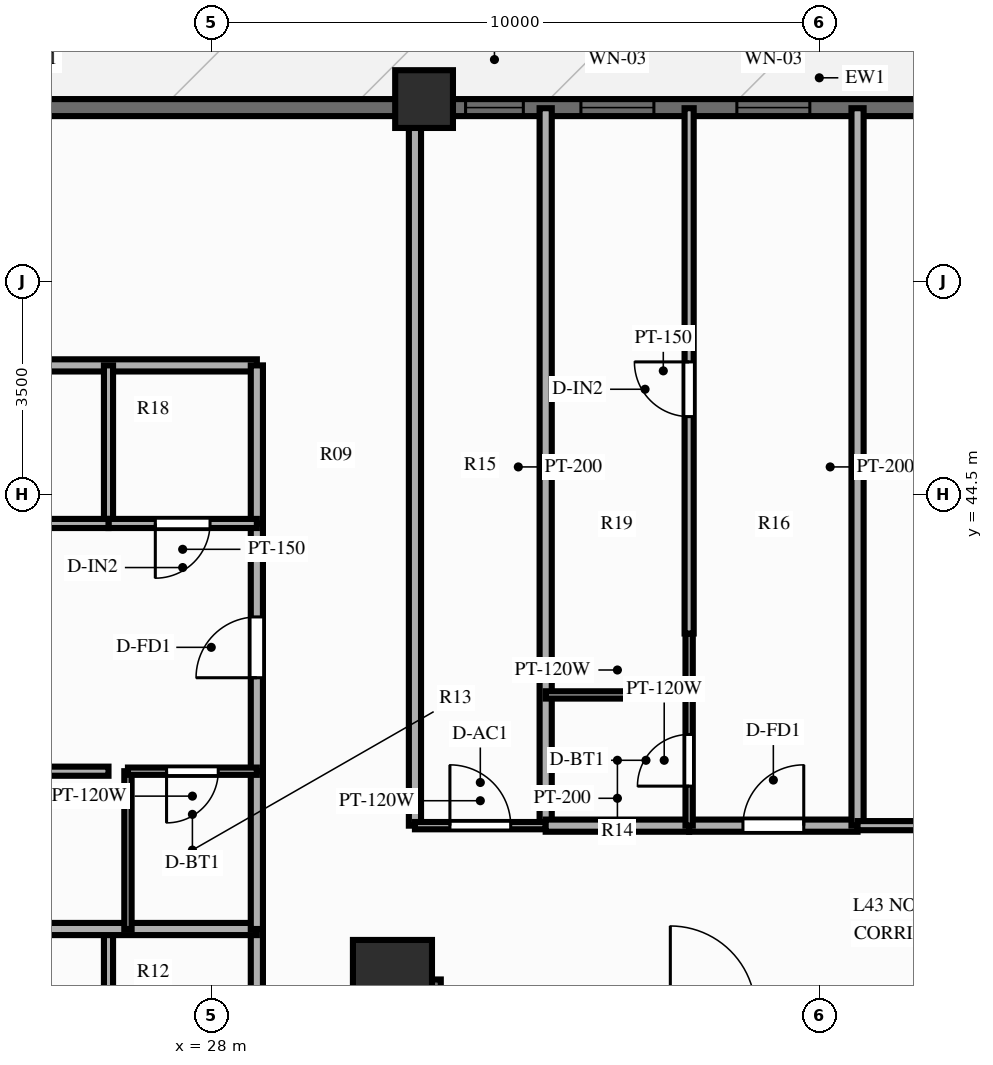
"""IFC4 building model, lengths in metres.
Left out: names, types, materials, properties, quantities, classifications, styles, units other than length and angle.
Written with IfcOpenShell. Run it as: python <this file> out.ifc"""

import sys

from ifc_helpers import new_model, si_unit, direction, frame, frame_2d, origin, origin_2d, place, context, subcontext, project, spatial, rectangle, extrude, source, transform, mapped, element, fill, save


model = new_model("IFC4")
c1 = context("Model", 3, precision=1e-05, world=origin(), true_north=direction((0.0, 1.0)))
c2 = subcontext(c1, "Body", "Model", "MODEL_VIEW")
j1 = project(units=[si_unit("LENGTHUNIT", "METRE"), si_unit("PLANEANGLEUNIT", "RADIAN")], contexts=[c1])
p1 = place(None, origin())
s1 = spatial("IfcSite", under=j1, at=p1, CompositionType="ELEMENT")
p2 = place(p1, origin())
s2 = spatial("IfcBuilding", under=s1, at=p2, CompositionType="ELEMENT")
p3 = place(p2, frame((0.0, 0.0, 135.75)))
s3 = spatial("IfcBuildingStorey", under=s2, at=p3, CompositionType="ELEMENT", Elevation=135.75)
p4 = place(p3, frame((31.5, 17.48, 0.0), z_axis=(0.0, 0.0, 1.0), x_axis=(0.0, 1.0, 0.0)))
e1 = element("IfcWall", 1, at=p4, inside=s3, PredefinedType="SHEAR", context=c2, shape_type="SweptSolid", body=[
    extrude(rectangle(XDim=19.04, YDim=0.55, at=frame_2d((9.52, 0.0))), origin(), (0.0, 0.0, 1.0), 3.0),
])
p5 = place(p4, frame((6.32, 0.0, 0.0)))
e2 = element("IfcOpeningElement", 2, at=p5, cuts=e1, PredefinedType="OPENING", context=c2, shape_type="SweptSolid", body=[
    extrude(rectangle(XDim=1.1, YDim=2.15, at=frame_2d((0.55, 1.075))), frame((0.0, 0.287, 0.0), z_axis=(0.0, -1.0, 0.0), x_axis=(1.0, 0.0, 0.0)), (0.0, 0.0, 1.0), 0.574),
])
m1 = source(origin(), c2, "Body", "SweptSolid", [
    extrude(rectangle(XDim=1.3, YDim=1.3, at=origin_2d()), origin(), (0.0, 0.0, 1.0), 3.0),
])
p6 = place(p3, frame((30.98, 36.52, 0.0), z_axis=(0.0, 0.0, 1.0), x_axis=(1.0, 0.0, 0.0)))
e3 = element("IfcColumn", 3, at=p6, inside=s3, PredefinedType="COLUMN", context=c2, shape_type="MappedRepresentation", body=[
    mapped(m1, transform((0.0, 0.0, 0.0), scale=1.0)),
])
m2 = source(origin(), c2, "Body", "SweptSolid", [
    extrude(rectangle(XDim=0.95, YDim=0.95, at=origin_2d()), origin(), (0.0, 0.0, 1.0), 3.0),
])
p7 = place(p3, frame((31.5, 51.0, 0.0), z_axis=(0.0, 0.0, 1.0), x_axis=(1.0, 0.0, 0.0)))
e4 = element("IfcColumn", 4, at=p7, inside=s3, PredefinedType="COLUMN", context=c2, shape_type="MappedRepresentation", body=[
    mapped(m2, transform((0.0, 0.0, 0.0), scale=1.0)),
])
p8 = place(p3, frame((16.2, 50.86, 0.0), z_axis=(0.0, 0.0, 1.0), x_axis=(1.0, 0.0, 0.0)))
e5 = element("IfcWall", 5, at=p8, inside=s3, PredefinedType="SOLIDWALL", context=c2, shape_type="SweptSolid", body=[
    extrude(rectangle(XDim=43.6, YDim=0.28, at=frame_2d((21.8, 0.0))), origin(), (0.0, 0.0, 1.0), 2.28),
])
p9 = place(p8, frame((7.1, 0.0, 0.0)))
e6 = element("IfcOpeningElement", 6, at=p9, cuts=e5, PredefinedType="OPENING", context=c2, shape_type="SweptSolid", body=[
    extrude(rectangle(XDim=1.1, YDim=2.15, at=frame_2d((0.55, 1.075))), frame((0.0, 0.152, 0.0), z_axis=(0.0, -1.0, 0.0), x_axis=(1.0, 0.0, 0.0)), (0.0, 0.0, 1.0), 0.304),
])
p10 = place(p8, frame((15.982, 0.0, 0.25)))
e7 = element("IfcOpeningElement", 7, at=p10, cuts=e5, PredefinedType="OPENING", context=c2, shape_type="SweptSolid", body=[
    extrude(rectangle(XDim=0.95, YDim=1.5, at=frame_2d((0.475, 0.75))), frame((0.0, 0.152, 0.0), z_axis=(0.0, -1.0, 0.0), x_axis=(1.0, 0.0, 0.0)), (0.0, 0.0, 1.0), 0.304),
])
p11 = place(p8, frame((17.88, 0.0, 0.25)))
e8 = element("IfcOpeningElement", 8, at=p11, cuts=e5, PredefinedType="OPENING", context=c2, shape_type="SweptSolid", body=[
    extrude(rectangle(XDim=1.2, YDim=1.5, at=frame_2d((0.6, 0.75))), frame((0.0, 0.152, 0.0), z_axis=(0.0, -1.0, 0.0), x_axis=(1.0, 0.0, 0.0)), (0.0, 0.0, 1.0), 0.304),
])
p12 = place(p8, frame((20.444, 0.0, 0.25)))
e9 = element("IfcOpeningElement", 9, at=p12, cuts=e5, PredefinedType="OPENING", context=c2, shape_type="SweptSolid", body=[
    extrude(rectangle(XDim=1.2, YDim=1.5, at=frame_2d((0.6, 0.75))), frame((0.0, 0.152, 0.0), z_axis=(0.0, -1.0, 0.0), x_axis=(1.0, 0.0, 0.0)), (0.0, 0.0, 1.0), 0.304),
])
p13 = place(p8, frame((24.607, 0.0, 0.25)))
e10 = element("IfcOpeningElement", 10, at=p13, cuts=e5, PredefinedType="OPENING", context=c2, shape_type="SweptSolid", body=[
    extrude(rectangle(XDim=1.2, YDim=1.5, at=frame_2d((0.6, 0.75))), frame((0.0, 0.152, 0.0), z_axis=(0.0, -1.0, 0.0), x_axis=(1.0, 0.0, 0.0)), (0.0, 0.0, 1.0), 0.304),
])
p14 = place(p8, frame((35.35, 0.0, 0.25)))
e11 = element("IfcOpeningElement", 11, at=p14, cuts=e5, PredefinedType="OPENING", context=c2, shape_type="SweptSolid", body=[
    extrude(rectangle(XDim=1.2, YDim=1.5, at=frame_2d((0.6, 0.75))), frame((0.0, 0.152, 0.0), z_axis=(0.0, -1.0, 0.0), x_axis=(1.0, 0.0, 0.0)), (0.0, 0.0, 1.0), 0.304),
])
p15 = place(p3, frame((31.35, 39.05, 0.0), z_axis=(0.0, 0.0, 1.0), x_axis=(0.0, 1.0, 0.0)))
e12 = element("IfcWall", 12, at=p15, inside=s3, PredefinedType="PARTITIONING", context=c2, shape_type="SweptSolid", body=[
    extrude(rectangle(XDim=11.8, YDim=0.2, at=frame_2d((5.9, 0.0))), origin(), (0.0, 0.0, 1.0), 2.34),
])
p16 = place(p3, frame((33.5, 39.05, 0.0), z_axis=(0.0, 0.0, 1.0), x_axis=(0.0, 1.0, 0.0)))
e13 = element("IfcWall", 13, at=p16, inside=s3, PredefinedType="PARTITIONING", context=c2, shape_type="SweptSolid", body=[
    extrude(rectangle(XDim=11.8, YDim=0.2, at=frame_2d((5.9, 0.0))), origin(), (0.0, 0.0, 1.0), 2.79),
])
p17 = place(p3, frame((31.35, 39.05, 0.0), z_axis=(0.0, 0.0, 1.0), x_axis=(1.0, 0.0, 0.0)))
e14 = element("IfcWall", 14, at=p17, inside=s3, PredefinedType="PARTITIONING", context=c2, shape_type="SweptSolid", body=[
    extrude(rectangle(XDim=2.15, YDim=0.12, at=frame_2d((1.075, 0.0))), origin(), (0.0, 0.0, 1.0), 2.79),
])
p18 = place(p17, frame((0.575, 0.0, 0.0)))
e15 = element("IfcOpeningElement", 15, at=p18, cuts=e14, PredefinedType="OPENING", context=c2, shape_type="SweptSolid", body=[
    extrude(rectangle(XDim=1.0, YDim=2.1, at=frame_2d((0.5, 1.05))), frame((0.0, 0.072, 0.0), z_axis=(0.0, -1.0, 0.0), x_axis=(1.0, 0.0, 0.0)), (0.0, 0.0, 1.0), 0.144),
])
p19 = place(p3, frame((33.5, 39.05, 0.0), z_axis=(0.0, 0.0, 1.0), x_axis=(1.0, 0.0, 0.0)))
e16 = element("IfcWall", 16, at=p19, inside=s3, PredefinedType="PARTITIONING", context=c2, shape_type="SweptSolid", body=[
    extrude(rectangle(XDim=2.359, YDim=0.2, at=frame_2d((1.18, 0.0))), origin(), (0.0, 0.0, 1.0), 2.79),
])
p20 = place(p3, frame((35.859, 39.05, 0.0), z_axis=(0.0, 0.0, 1.0), x_axis=(1.0, 0.0, 0.0)))
e17 = element("IfcWall", 17, at=p20, inside=s3, PredefinedType="PARTITIONING", context=c2, shape_type="SweptSolid", body=[
    extrude(rectangle(XDim=2.77, YDim=0.2, at=frame_2d((1.385, 0.0))), origin(), (0.0, 0.0, 1.0), 2.79),
])
p21 = place(p20, frame((0.885, 0.0, 0.0)))
e18 = element("IfcOpeningElement", 18, at=p21, cuts=e17, PredefinedType="OPENING", context=c2, shape_type="SweptSolid", body=[
    extrude(rectangle(XDim=1.0, YDim=2.15, at=frame_2d((0.5, 1.075))), frame((0.0, 0.112, 0.0), z_axis=(0.0, -1.0, 0.0), x_axis=(1.0, 0.0, 0.0)), (0.0, 0.0, 1.0), 0.224),
])
p22 = place(p3, frame((35.859, 39.05, 0.0), z_axis=(0.0, 0.0, 1.0), x_axis=(0.0, 1.0, 0.0)))
e19 = element("IfcWall", 19, at=p22, inside=s3, PredefinedType="PARTITIONING", context=c2, shape_type="SweptSolid", body=[
    extrude(rectangle(XDim=2.15, YDim=0.12, at=frame_2d((1.075, 0.0))), origin(), (0.0, 0.0, 1.0), 2.79),
])
p23 = place(p22, frame((0.65, 0.0, 0.0)))
e20 = element("IfcOpeningElement", 20, at=p23, cuts=e19, PredefinedType="OPENING", context=c2, shape_type="SweptSolid", body=[
    extrude(rectangle(XDim=0.85, YDim=2.05, at=frame_2d((0.425, 1.025))), frame((0.0, 0.072, 0.0), z_axis=(0.0, -1.0, 0.0), x_axis=(1.0, 0.0, 0.0)), (0.0, 0.0, 1.0), 0.144),
])
p24 = place(p3, frame((35.859, 41.2, 0.0), z_axis=(0.0, 0.0, 1.0), x_axis=(0.0, 1.0, 0.0)))
e21 = element("IfcWall", 21, at=p24, inside=s3, PredefinedType="PARTITIONING", context=c2, shape_type="SweptSolid", body=[
    extrude(rectangle(XDim=1.01, YDim=0.12, at=frame_2d((0.505, 0.0))), origin(), (0.0, 0.0, 1.0), 2.79),
])
p25 = place(p3, frame((33.5, 41.2, 0.0), z_axis=(0.0, 0.0, 1.0), x_axis=(1.0, 0.0, 0.0)))
e22 = element("IfcWall", 22, at=p25, inside=s3, PredefinedType="PARTITIONING", context=c2, shape_type="SweptSolid", body=[
    extrude(rectangle(XDim=2.359, YDim=0.12, at=frame_2d((1.18, 0.0))), origin(), (0.0, 0.0, 1.0), 2.79),
])
p26 = place(p3, frame((35.859, 42.21, 0.0), z_axis=(0.0, 0.0, 1.0), x_axis=(0.0, 1.0, 0.0)))
e23 = element("IfcWall", 23, at=p26, inside=s3, PredefinedType="PARTITIONING", context=c2, shape_type="SweptSolid", body=[
    extrude(rectangle(XDim=8.64, YDim=0.15, at=frame_2d((4.32, 0.0))), origin(), (0.0, 0.0, 1.0), 2.79),
])
p27 = place(p26, frame((3.567, 0.0, 0.0)))
e24 = element("IfcOpeningElement", 24, at=p27, cuts=e23, PredefinedType="OPENING", context=c2, shape_type="SweptSolid", body=[
    extrude(rectangle(XDim=0.9, YDim=2.1, at=frame_2d((0.45, 1.05))), frame((0.0, 0.087, 0.0), z_axis=(0.0, -1.0, 0.0), x_axis=(1.0, 0.0, 0.0)), (0.0, 0.0, 1.0), 0.174),
])
p28 = place(p3, frame((38.629, 39.05, 0.0), z_axis=(0.0, 0.0, 1.0), x_axis=(0.0, 1.0, 0.0)))
e25 = element("IfcWall", 25, at=p28, inside=s3, PredefinedType="PARTITIONING", context=c2, shape_type="SweptSolid", body=[
    extrude(rectangle(XDim=11.8, YDim=0.2, at=frame_2d((5.9, 0.0))), origin(), (0.0, 0.0, 1.0), 2.79),
])
p29 = place(p3, frame((38.629, 39.05, 0.0), z_axis=(0.0, 0.0, 1.0), x_axis=(1.0, 0.0, 0.0)))
e26 = element("IfcWall", 26, at=p29, inside=s3, PredefinedType="PARTITIONING", context=c2, shape_type="SweptSolid", body=[
    extrude(rectangle(XDim=6.021, YDim=0.15, at=frame_2d((3.01, 0.0))), origin(), (0.0, 0.0, 1.0), 2.79),
])
p30 = place(p29, frame((2.46, 0.0, 0.0)))
e27 = element("IfcOpeningElement", 27, at=p30, cuts=e26, PredefinedType="OPENING", context=c2, shape_type="SweptSolid", body=[
    extrude(rectangle(XDim=1.1, YDim=2.15, at=frame_2d((0.55, 1.075))), frame((0.0, 0.087, 0.0), z_axis=(0.0, -1.0, 0.0), x_axis=(1.0, 0.0, 0.0)), (0.0, 0.0, 1.0), 0.174),
])
p31 = place(p3, frame((28.75, 46.62, 0.0), z_axis=(0.0, 0.0, 1.0), x_axis=(-1.0, 0.0, 0.0)))
e28 = element("IfcWall", 28, at=p31, inside=s3, PredefinedType="PARTITIONING", context=c2, shape_type="SweptSolid", body=[
    extrude(rectangle(XDim=16.6, YDim=0.2, at=frame_2d((8.3, 0.0))), origin(), (0.0, 0.0, 1.0), 2.79),
])
p32 = place(p3, frame((28.75, 34.75, 0.0), z_axis=(0.0, 0.0, 1.0), x_axis=(0.0, 1.0, 0.0)))
e29 = element("IfcWall", 29, at=p32, inside=s3, PredefinedType="PARTITIONING", context=c2, shape_type="SweptSolid", body=[
    extrude(rectangle(XDim=2.6, YDim=0.2, at=frame_2d((1.3, 0.0))), origin(), (0.0, 0.0, 1.0), 2.79),
])
p33 = place(p3, frame((26.31, 34.75, 0.0), z_axis=(0.0, 0.0, 1.0), x_axis=(0.0, 1.0, 0.0)))
e30 = element("IfcWall", 30, at=p33, inside=s3, PredefinedType="PARTITIONING", context=c2, shape_type="SweptSolid", body=[
    extrude(rectangle(XDim=2.6, YDim=0.15, at=frame_2d((1.3, 0.0))), origin(), (0.0, 0.0, 1.0), 2.79),
])
p34 = place(p3, frame((28.75, 37.35, 0.0), z_axis=(0.0, 0.0, 1.0), x_axis=(-1.0, 0.0, 0.0)))
e31 = element("IfcWall", 31, at=p34, inside=s3, PredefinedType="PARTITIONING", context=c2, shape_type="SweptSolid", body=[
    extrude(rectangle(XDim=16.6, YDim=0.2, at=frame_2d((8.3, 0.0))), origin(), (0.0, 0.0, 1.0), 2.79),
])
p35 = place(p3, frame((28.75, 37.35, 0.0), z_axis=(0.0, 0.0, 1.0), x_axis=(0.0, 1.0, 0.0)))
e32 = element("IfcWall", 32, at=p35, inside=s3, PredefinedType="PARTITIONING", context=c2, shape_type="SweptSolid", body=[
    extrude(rectangle(XDim=2.595, YDim=0.2, at=frame_2d((1.298, 0.0))), origin(), (0.0, 0.0, 1.0), 2.79),
])
p36 = place(p3, frame((28.75, 39.946, 0.0), z_axis=(0.0, 0.0, 1.0), x_axis=(0.0, 1.0, 0.0)))
e33 = element("IfcWall", 33, at=p36, inside=s3, PredefinedType="PARTITIONING", context=c2, shape_type="SweptSolid", body=[
    extrude(rectangle(XDim=4.074, YDim=0.2, at=frame_2d((2.037, 0.0))), origin(), (0.0, 0.0, 1.0), 2.79),
])
p37 = place(p36, frame((1.537, 0.0, 0.0)))
e34 = element("IfcOpeningElement", 34, at=p37, cuts=e33, PredefinedType="OPENING", context=c2, shape_type="SweptSolid", body=[
    extrude(rectangle(XDim=1.0, YDim=2.15, at=frame_2d((0.5, 1.075))), frame((0.0, 0.112, 0.0), z_axis=(0.0, -1.0, 0.0), x_axis=(1.0, 0.0, 0.0)), (0.0, 0.0, 1.0), 0.224),
])
p38 = place(p3, frame((28.75, 44.02, 0.0), z_axis=(0.0, 0.0, 1.0), x_axis=(0.0, 1.0, 0.0)))
e35 = element("IfcWall", 35, at=p38, inside=s3, PredefinedType="PARTITIONING", context=c2, shape_type="SweptSolid", body=[
    extrude(rectangle(XDim=2.6, YDim=0.2, at=frame_2d((1.3, 0.0))), origin(), (0.0, 0.0, 1.0), 2.79),
])
p39 = place(p3, frame((26.63, 37.35, 0.0), z_axis=(0.0, 0.0, 1.0), x_axis=(0.0, 1.0, 0.0)))
e36 = element("IfcWall", 36, at=p39, inside=s3, PredefinedType="PARTITIONING", context=c2, shape_type="SweptSolid", body=[
    extrude(rectangle(XDim=2.595, YDim=0.12, at=frame_2d((1.298, 0.0))), origin(), (0.0, 0.0, 1.0), 2.79),
])
p40 = place(p3, frame((26.31, 44.02, 0.0), z_axis=(0.0, 0.0, 1.0), x_axis=(0.0, 1.0, 0.0)))
e37 = element("IfcWall", 37, at=p40, inside=s3, PredefinedType="PARTITIONING", context=c2, shape_type="SweptSolid", body=[
    extrude(rectangle(XDim=2.6, YDim=0.15, at=frame_2d((1.3, 0.0))), origin(), (0.0, 0.0, 1.0), 2.79),
])
p41 = place(p3, frame((28.75, 39.946, 0.0), z_axis=(0.0, 0.0, 1.0), x_axis=(-1.0, 0.0, 0.0)))
e38 = element("IfcWall", 38, at=p41, inside=s3, PredefinedType="PARTITIONING", context=c2, shape_type="SweptSolid", body=[
    extrude(rectangle(XDim=2.12, YDim=0.12, at=frame_2d((1.06, 0.0))), origin(), (0.0, 0.0, 1.0), 2.79),
])
p42 = place(p41, frame((0.635, 0.0, 0.0)))
e39 = element("IfcOpeningElement", 39, at=p42, cuts=e38, PredefinedType="OPENING", context=c2, shape_type="SweptSolid", body=[
    extrude(rectangle(XDim=0.85, YDim=2.05, at=frame_2d((0.425, 1.025))), frame((0.0, 0.072, 0.0), z_axis=(0.0, -1.0, 0.0), x_axis=(1.0, 0.0, 0.0)), (0.0, 0.0, 1.0), 0.144),
])
p43 = place(p3, frame((26.31, 39.946, 0.0), z_axis=(0.0, 0.0, 1.0), x_axis=(-1.0, 0.0, 0.0)))
e40 = element("IfcWall", 40, at=p43, inside=s3, PredefinedType="PARTITIONING", context=c2, shape_type="SweptSolid", body=[
    extrude(rectangle(XDim=14.16, YDim=0.15, at=frame_2d((7.08, 0.0))), origin(), (0.0, 0.0, 1.0), 2.79),
])
p44 = place(p43, frame((6.097, 0.0, 0.0)))
e41 = element("IfcOpeningElement", 41, at=p44, cuts=e40, PredefinedType="OPENING", context=c2, shape_type="SweptSolid", body=[
    extrude(rectangle(XDim=0.9, YDim=2.1, at=frame_2d((0.45, 1.05))), frame((0.0, 0.087, 0.0), z_axis=(0.0, -1.0, 0.0), x_axis=(1.0, 0.0, 0.0)), (0.0, 0.0, 1.0), 0.174),
])
p45 = place(p3, frame((28.75, 44.02, 0.0), z_axis=(0.0, 0.0, 1.0), x_axis=(-1.0, 0.0, 0.0)))
e42 = element("IfcWall", 42, at=p45, inside=s3, PredefinedType="PARTITIONING", context=c2, shape_type="SweptSolid", body=[
    extrude(rectangle(XDim=2.44, YDim=0.15, at=frame_2d((1.22, 0.0))), origin(), (0.0, 0.0, 1.0), 2.79),
])
p46 = place(p45, frame((0.77, 0.0, 0.0)))
e43 = element("IfcOpeningElement", 43, at=p46, cuts=e42, PredefinedType="OPENING", context=c2, shape_type="SweptSolid", body=[
    extrude(rectangle(XDim=0.9, YDim=2.1, at=frame_2d((0.45, 1.05))), frame((0.0, 0.087, 0.0), z_axis=(0.0, -1.0, 0.0), x_axis=(1.0, 0.0, 0.0)), (0.0, 0.0, 1.0), 0.174),
])
p47 = place(p3, frame((26.31, 44.02, 0.0), z_axis=(0.0, 0.0, 1.0), x_axis=(-1.0, 0.0, 0.0)))
e44 = element("IfcWall", 44, at=p47, inside=s3, PredefinedType="PARTITIONING", context=c2, shape_type="SweptSolid", body=[
    extrude(rectangle(XDim=14.16, YDim=0.15, at=frame_2d((7.08, 0.0))), origin(), (0.0, 0.0, 1.0), 2.79),
])
p48 = place(p47, frame((6.097, 0.0, 0.0)))
e45 = element("IfcOpeningElement", 45, at=p48, cuts=e44, PredefinedType="OPENING", context=c2, shape_type="SweptSolid", body=[
    extrude(rectangle(XDim=0.9, YDim=2.1, at=frame_2d((0.45, 1.05))), frame((0.0, 0.087, 0.0), z_axis=(0.0, -1.0, 0.0), x_axis=(1.0, 0.0, 0.0)), (0.0, 0.0, 1.0), 0.174),
])
m3 = source(origin(), c2, "Body", "SweptSolid", [
    extrude(rectangle(XDim=0.95, YDim=1.5, at=frame_2d((0.475, 0.75))), frame((0.0, 0.03, 0.0), z_axis=(0.0, -1.0, 0.0), x_axis=(1.0, 0.0, 0.0)), (0.0, 0.0, 1.0), 0.06),
])
p49 = place(p10, origin())
e46 = element("IfcWindow", 46, at=p49, inside=s3, PartitioningType="SINGLE_PANEL", PredefinedType="WINDOW", context=c2, shape_type="MappedRepresentation", body=[
    mapped(m3, transform((0.0, 0.0, 0.0), scale=1.0)),
])
fill(e7, e46)
m4 = source(origin(), c2, "Body", "SweptSolid", [
    extrude(rectangle(XDim=1.2, YDim=1.5, at=frame_2d((0.6, 0.75))), frame((0.0, 0.03, 0.0), z_axis=(0.0, -1.0, 0.0), x_axis=(1.0, 0.0, 0.0)), (0.0, 0.0, 1.0), 0.06),
])
p50 = place(p11, origin())
e47 = element("IfcWindow", 47, at=p50, inside=s3, PartitioningType="SINGLE_PANEL", PredefinedType="WINDOW", context=c2, shape_type="MappedRepresentation", body=[
    mapped(m4, transform((0.0, 0.0, 0.0), scale=1.0)),
])
fill(e8, e47)
p51 = place(p12, origin())
e48 = element("IfcWindow", 48, at=p51, inside=s3, PartitioningType="SINGLE_PANEL", PredefinedType="WINDOW", context=c2, shape_type="MappedRepresentation", body=[
    mapped(m4, transform((0.0, 0.0, 0.0), scale=1.0)),
])
fill(e9, e48)
m5 = source(origin(), c2, "Body", "SweptSolid", [
    extrude(rectangle(XDim=1.0, YDim=2.1, at=frame_2d((0.5, 1.05))), frame((0.0, 0.025, 0.0), z_axis=(0.0, -1.0, 0.0), x_axis=(1.0, 0.0, 0.0)), (0.0, 0.0, 1.0), 0.05),
])
p52 = place(p18, origin())
e49 = element("IfcDoor", 49, at=p52, inside=s3, OperationType="SINGLE_SWING_LEFT", PredefinedType="DOOR", context=c2, shape_type="MappedRepresentation", body=[
    mapped(m5, transform((0.0, 0.0, 0.0), scale=1.0)),
])
fill(e15, e49)
m6 = source(origin(), c2, "Body", "SweptSolid", [
    extrude(rectangle(XDim=1.0, YDim=2.15, at=frame_2d((0.5, 1.075))), frame((0.0, 0.025, 0.0), z_axis=(0.0, -1.0, 0.0), x_axis=(1.0, 0.0, 0.0)), (0.0, 0.0, 1.0), 0.05),
])
p53 = place(p21, origin())
e50 = element("IfcDoor", 50, at=p53, inside=s3, OperationType="SINGLE_SWING_RIGHT", PredefinedType="DOOR", context=c2, shape_type="MappedRepresentation", body=[
    mapped(m6, transform((0.0, 0.0, 0.0), scale=1.0)),
])
fill(e18, e50)
m7 = source(origin(), c2, "Body", "SweptSolid", [
    extrude(rectangle(XDim=0.85, YDim=2.05, at=frame_2d((0.425, 1.025))), frame((0.0, 0.025, 0.0), z_axis=(0.0, -1.0, 0.0), x_axis=(1.0, 0.0, 0.0)), (0.0, 0.0, 1.0), 0.05),
])
p54 = place(p23, origin())
e51 = element("IfcDoor", 51, at=p54, inside=s3, OperationType="SINGLE_SWING_LEFT", PredefinedType="DOOR", context=c2, shape_type="MappedRepresentation", body=[
    mapped(m7, transform((0.0, 0.0, 0.0), scale=1.0)),
])
fill(e20, e51)
m8 = source(origin(), c2, "Body", "SweptSolid", [
    extrude(rectangle(XDim=0.9, YDim=2.1, at=frame_2d((0.45, 1.05))), frame((0.0, 0.025, 0.0), z_axis=(0.0, -1.0, 0.0), x_axis=(1.0, 0.0, 0.0)), (0.0, 0.0, 1.0), 0.05),
])
p55 = place(p27, origin())
e52 = element("IfcDoor", 52, at=p55, inside=s3, OperationType="SINGLE_SWING_RIGHT", PredefinedType="DOOR", context=c2, shape_type="MappedRepresentation", body=[
    mapped(m8, transform((0.0, 0.0, 0.0), scale=1.0)),
])
fill(e24, e52)
p56 = place(p37, origin())
e53 = element("IfcDoor", 53, at=p56, inside=s3, OperationType="SINGLE_SWING_LEFT", PredefinedType="DOOR", context=c2, shape_type="MappedRepresentation", body=[
    mapped(m6, transform((0.0, 0.0, 0.0), scale=1.0)),
])
fill(e34, e53)
p57 = place(p42, origin())
e54 = element("IfcDoor", 54, at=p57, inside=s3, OperationType="SINGLE_SWING_RIGHT", PredefinedType="DOOR", context=c2, shape_type="MappedRepresentation", body=[
    mapped(m7, transform((0.0, 0.0, 0.0), scale=1.0)),
])
fill(e39, e54)
p58 = place(p46, origin())
e55 = element("IfcDoor", 55, at=p58, inside=s3, OperationType="SINGLE_SWING_RIGHT", PredefinedType="DOOR", context=c2, shape_type="MappedRepresentation", body=[
    mapped(m8, transform((0.0, 0.0, 0.0), scale=1.0)),
])
fill(e43, e55)
save(model, sys.argv[1])
